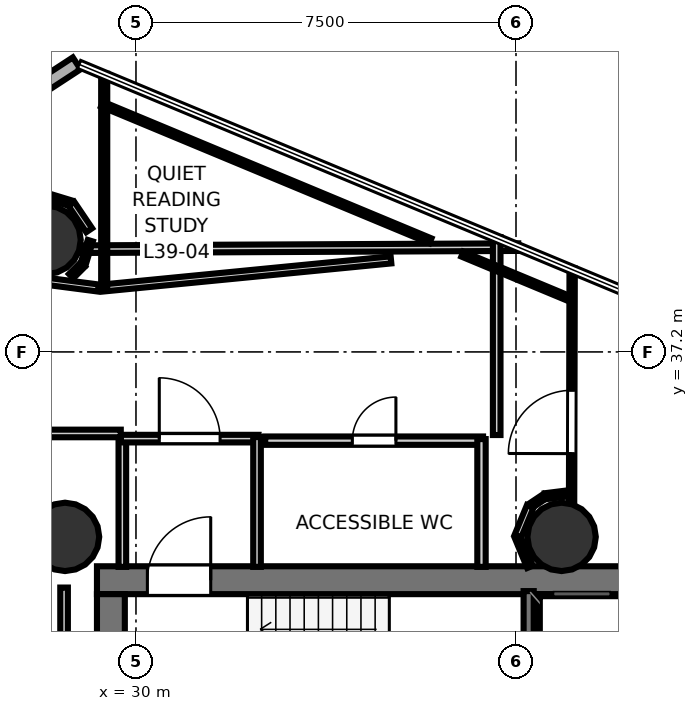
"""IFC4 building model, lengths in metres.
Left out: names, types, materials, properties, quantities, classifications, styles, units other than length and angle.
Written with IfcOpenShell. Run it as: python <this file> out.ifc"""

import sys

from ifc_helpers import new_model, si_unit, direction, frame, frame_2d, origin, origin_2d, place, context, subcontext, project, spatial, rectangle, hollow_circle, extrude, element, fill, save


model = new_model("IFC4")
c1 = context("Model", 3, precision=1e-05, world=origin(), true_north=direction((0.0, 1.0)))
c2 = subcontext(c1, "Body", "Model", "MODEL_VIEW")
j1 = project(units=[si_unit("LENGTHUNIT", "METRE"), si_unit("PLANEANGLEUNIT", "RADIAN")], contexts=[c1])
p1 = place(None, origin())
s1 = spatial("IfcSite", under=j1, at=p1, CompositionType="ELEMENT")
p2 = place(p1, origin())
s2 = spatial("IfcBuilding", under=s1, at=p2, CompositionType="ELEMENT")
p3 = place(p2, frame((0.0, 0.0, 155.0)))
s3 = spatial("IfcBuildingStorey", under=s2, at=p3, CompositionType="ELEMENT", Elevation=155.0)
p4 = place(p3, frame((29.23, 32.695, 0.0), z_axis=(0.0, 0.0, 1.0), x_axis=(1.0, 0.0, 0.0)))
e1 = element("IfcWall", 1, at=p4, inside=s3, PredefinedType="SHEAR", context=c2, shape_type="SweptSolid", body=[
    extrude(rectangle(XDim=10.62, YDim=0.55, at=frame_2d((5.31, 0.0))), origin(), (0.0, 0.0, 1.0), 3.52),
])
p5 = place(p4, frame((0.995, 0.0, 0.0)))
e2 = element("IfcOpeningElement", 2, at=p5, cuts=e1, PredefinedType="OPENING", context=c2, shape_type="SweptSolid", body=[
    extrude(rectangle(XDim=1.25, YDim=2.15, at=frame_2d((0.625, 1.075))), frame((0.0, 0.285, 0.0), z_axis=(0.0, -1.0, 0.0), x_axis=(1.0, 0.0, 0.0)), (0.0, 0.0, 1.0), 0.57),
])
p6 = place(p3, frame((29.505, 24.98, 0.0), z_axis=(0.0, 0.0, 1.0), x_axis=(0.0, 1.0, 0.0)))
e3 = element("IfcWall", 3, at=p6, inside=s3, PredefinedType="SHEAR", context=c2, shape_type="SweptSolid", body=[
    extrude(rectangle(XDim=7.44, YDim=0.55, at=frame_2d((3.72, 0.0))), origin(), (0.0, 0.0, 1.0), 3.52),
])
p7 = place(p3, frame((38.18, 24.98, 0.0), z_axis=(0.0, 0.0, 1.0), x_axis=(0.0, 1.0, 0.0)))
e4 = element("IfcWall", 4, at=p7, inside=s3, PredefinedType="SHEAR", context=c2, shape_type="SweptSolid", body=[
    extrude(rectangle(XDim=7.44, YDim=0.5, at=frame_2d((3.72, 0.0))), origin(), (0.0, 0.0, 1.0), 3.52),
])
for number, where, z_axis, x_axis in (
    (5, (28.6, 33.55, 0.0), (0.0, 0.0, 1.0), (1.0, 0.0, 0.0)),
    (6, (38.4, 33.55, 0.0), (0.0, 0.0, 1.0), (1.0, 0.0, 0.0)),
    (7, (28.235, 39.411, 0.0), (0.0, 0.0, 1.0), (1.0, 0.0, 0.0)),
):
    element("IfcColumn", number, at=place(p3, frame(where, z_axis=z_axis, x_axis=x_axis)), inside=s3, PredefinedType="COLUMN", context=c2, shape_type="SweptSolid", body=[
        extrude(hollow_circle(Radius=0.675, WallThickness=0.032, at=origin_2d()), origin(), (0.0, 0.0, 1.0), 3.7),
    ])
p8 = place(p3, frame((28.83, 42.894, 0.0), z_axis=(0.0, 0.0, 1.0), x_axis=(-0.837273291315, -0.5467846337, 0.0)))
e8 = element("IfcWall", 8, at=p8, inside=s3, PredefinedType="SOLIDWALL", context=c2, shape_type="SweptSolid", body=[
    extrude(rectangle(XDim=9.004, YDim=0.28, at=frame_2d((4.502, 0.0))), origin(), (0.0, 0.0, 1.0), 3.52),
])
p9 = place(p8, frame((1.951, 0.0, 0.85)))
e9 = element("IfcOpeningElement", 9, at=p9, cuts=e8, PredefinedType="OPENING", context=c2, shape_type="SweptSolid", body=[
    extrude(rectangle(XDim=1.5, YDim=2.1, at=frame_2d((0.75, 1.05))), frame((0.0, 0.15, 0.0), z_axis=(0.0, -1.0, 0.0), x_axis=(1.0, 0.0, 0.0)), (0.0, 0.0, 1.0), 0.3),
])
p10 = place(p3, frame((37.75, 30.12, 0.0), z_axis=(0.0, 0.0, 1.0), x_axis=(0.0, 1.0, 0.0)))
e10 = element("IfcWall", 10, at=p10, inside=s3, PredefinedType="SOLIDWALL", context=c2, shape_type="SweptSolid", body=[
    extrude(rectangle(XDim=2.36, YDim=0.2, at=frame_2d((1.18, 0.0))), origin(), (0.0, 0.0, 1.0), 3.52),
])
p11 = place(p3, frame((29.731, 32.958, 0.0), z_axis=(0.0, 0.0, 1.0), x_axis=(0.0, 1.0, 0.0)))
e11 = element("IfcWall", 11, at=p11, inside=s3, PredefinedType="PARTITIONING", context=c2, shape_type="SweptSolid", body=[
    extrude(rectangle(XDim=2.562, YDim=0.15, at=frame_2d((1.281, 0.0))), origin(), (0.0, 0.0, 1.0), 2.84),
])
p12 = place(p3, frame((29.7, 35.489, 0.0), z_axis=(0.0, 0.0, 1.0), x_axis=(1.0, 0.0, 0.0)))
e12 = element("IfcWall", 12, at=p12, inside=s3, PredefinedType="PARTITIONING", context=c2, shape_type="SweptSolid", body=[
    extrude(rectangle(XDim=2.72, YDim=0.15, at=frame_2d((1.36, 0.0))), origin(), (0.0, 0.0, 1.0), 2.84),
])
p13 = place(p12, frame((0.76, 0.0, 0.0)))
e13 = element("IfcOpeningElement", 13, at=p13, cuts=e12, PredefinedType="OPENING", context=c2, shape_type="SweptSolid", body=[
    extrude(rectangle(XDim=1.2, YDim=2.15, at=frame_2d((0.6, 1.075))), frame((0.0, 0.085, 0.0), z_axis=(0.0, -1.0, 0.0), x_axis=(1.0, 0.0, 0.0)), (0.0, 0.0, 1.0), 0.17),
])
p14 = place(p3, frame((32.389, 35.52, 0.0), z_axis=(0.0, 0.0, 1.0), x_axis=(0.0, -1.0, 0.0)))
e14 = element("IfcWall", 14, at=p14, inside=s3, PredefinedType="PARTITIONING", context=c2, shape_type="SweptSolid", body=[
    extrude(rectangle(XDim=2.562, YDim=0.15, at=frame_2d((1.281, 0.0))), origin(), (0.0, 0.0, 1.0), 2.84),
])
p15 = place(p3, frame((32.55, 35.449, 0.0), z_axis=(0.0, 0.0, 1.0), x_axis=(1.0, 0.0, 0.0)))
e15 = element("IfcWall", 15, at=p15, inside=s3, PredefinedType="PLUMBINGWALL", context=c2, shape_type="SweptSolid", body=[
    extrude(rectangle(XDim=4.3, YDim=0.165, at=frame_2d((2.15, 0.0))), origin(), (0.0, 0.0, 1.0), 2.84),
])
p16 = place(p15, frame((1.72, 0.0, 0.0)))
e16 = element("IfcOpeningElement", 16, at=p16, cuts=e15, PredefinedType="OPENING", context=c2, shape_type="SweptSolid", body=[
    extrude(rectangle(XDim=0.86, YDim=2.05, at=frame_2d((0.43, 1.025))), frame((0.0, 0.093, 0.0), z_axis=(0.0, -1.0, 0.0), x_axis=(1.0, 0.0, 0.0)), (0.0, 0.0, 1.0), 0.185),
])
p17 = place(p3, frame((36.819, 35.48, 0.0), z_axis=(0.0, 0.0, 1.0), x_axis=(0.0, -1.0, 0.0)))
e17 = element("IfcWall", 17, at=p17, inside=s3, PredefinedType="PLUMBINGWALL", context=c2, shape_type="SweptSolid", body=[
    extrude(rectangle(XDim=2.522, YDim=0.165, at=frame_2d((1.261, 0.0))), origin(), (0.0, 0.0, 1.0), 2.84),
])
p18 = place(p3, frame((28.581, 24.68, 0.0), z_axis=(0.0, 0.0, 1.0), x_axis=(0.0, 1.0, 0.0)))
e18 = element("IfcWall", 18, at=p18, inside=s3, PredefinedType="PARTITIONING", context=c2, shape_type="SweptSolid", body=[
    extrude(rectangle(XDim=7.87, YDim=0.15, at=frame_2d((3.935, 0.0))), origin(), (0.0, 0.0, 1.0), 2.84),
])
p19 = place(p3, frame((23.174, 39.201, 0.0), z_axis=(0.0, 0.0, 1.0), x_axis=(0.999989166238, 0.004654826148, 0.0)))
e19 = element("IfcWall", 19, at=p19, inside=s3, PredefinedType="PARTITIONING", context=c2, shape_type="SweptSolid", body=[
    extrude(rectangle(XDim=14.371, YDim=0.15, at=frame_2d((7.186, 0.0))), origin(), (0.0, 0.0, 1.0), 2.84),
])
p20 = place(p3, frame((37.119, 39.465, 0.0), z_axis=(0.0, 0.0, 1.0), x_axis=(0.0, -1.0, 0.0)))
e20 = element("IfcWall", 20, at=p20, inside=s3, PredefinedType="PARTITIONING", context=c2, shape_type="SweptSolid", body=[
    extrude(rectangle(XDim=3.905, YDim=0.15, at=frame_2d((1.953, 0.0))), origin(), (0.0, 0.0, 1.0), 2.84),
])
p21 = place(p3, frame((29.7, 35.591, 0.0), z_axis=(0.0, 0.0, 1.0), x_axis=(-1.0, 0.0, 0.0)))
e21 = element("IfcWall", 21, at=p21, inside=s3, PredefinedType="PARTITIONING", context=c2, shape_type="SweptSolid", body=[
    extrude(rectangle(XDim=3.12, YDim=0.15, at=frame_2d((1.56, 0.0))), origin(), (0.0, 0.0, 1.0), 2.84),
])
p22 = place(p3, frame((38.594, 32.958, 0.0), z_axis=(0.0, 0.0, 1.0), x_axis=(0.002446602671, 0.999997007063, 0.0)))
e22 = element("IfcWall", 22, at=p22, inside=s3, PredefinedType="PARTITIONING", context=c2, shape_type="SweptSolid", body=[
    extrude(rectangle(XDim=5.887, YDim=0.105, at=frame_2d((2.944, 0.0))), origin(), (0.0, 0.0, 1.0), 2.84),
])
p23 = place(p22, frame((2.235, 0.0, 0.0)))
e23 = element("IfcOpeningElement", 23, at=p23, cuts=e22, PredefinedType="OPENING", context=c2, shape_type="SweptSolid", body=[
    extrude(rectangle(XDim=1.25, YDim=2.2, at=frame_2d((0.625, 1.1))), frame((0.0, 0.062, 0.0), z_axis=(0.0, -1.0, 0.0), x_axis=(1.0, 0.0, 0.0)), (0.0, 0.0, 1.0), 0.125),
])
p24 = place(p3, frame((35.033, 39.016, 0.0), z_axis=(0.0, 0.0, 1.0), x_axis=(-0.995275640249, -0.097089648918, 0.0)))
e24 = element("IfcWall", 24, at=p24, inside=s3, PredefinedType="PARTITIONING", context=c2, shape_type="SweptSolid", body=[
    extrude(rectangle(XDim=5.718, YDim=0.14, at=frame_2d((2.859, 0.0))), origin(), (0.0, 0.0, 1.0), 2.84),
])
p25 = place(p3, frame((29.373, 38.43, 0.0), z_axis=(0.0, 0.0, 1.0), x_axis=(0.0, 1.0, 0.0)))
e25 = element("IfcWall", 25, at=p25, inside=s3, PredefinedType="PARTITIONING", context=c2, shape_type="SweptSolid", body=[
    extrude(rectangle(XDim=4.258, YDim=0.12, at=frame_2d((2.129, 0.0))), origin(), (0.0, 0.0, 1.0), 2.84),
])
p26 = place(p3, frame((29.33, 42.089, 0.0), z_axis=(0.0, 0.0, 1.0), x_axis=(0.923257907731, -0.384180733265, 0.0)))
e26 = element("IfcWall", 26, at=p26, inside=s3, PredefinedType="PARTITIONING", context=c2, shape_type="SweptSolid", body=[
    extrude(rectangle(XDim=7.02, YDim=0.105, at=frame_2d((3.51, 0.0))), origin(), (0.0, 0.0, 1.0), 2.84),
])
p27 = place(p3, frame((38.502, 34.406, 0.0), z_axis=(0.0, 0.0, 1.0), x_axis=(-0.992260340351, -0.124174945004, 0.0)))
e27 = element("IfcWall", 27, at=p27, inside=s3, PredefinedType="PARTITIONING", context=c2, shape_type="SweptSolid", body=[
    extrude(rectangle(XDim=0.429, YDim=0.12, at=frame_2d((0.214, 0.0))), origin(), (0.0, 0.0, 1.0), 2.84),
])
p28 = place(p3, frame((38.063, 34.347, 0.0), z_axis=(0.0, 0.0, 1.0), x_axis=(-0.83170430964, -0.555218822922, 0.0)))
e28 = element("IfcWall", 28, at=p28, inside=s3, PredefinedType="PARTITIONING", context=c2, shape_type="SweptSolid", body=[
    extrude(rectangle(XDim=0.326, YDim=0.105, at=frame_2d((0.163, 0.0))), origin(), (0.0, 0.0, 1.0), 2.84),
])
p29 = place(p3, frame((37.781, 34.152, 0.0), z_axis=(0.0, 0.0, 1.0), x_axis=(-0.382824178437, -0.923821221018, 0.0)))
e29 = element("IfcWall", 29, at=p29, inside=s3, PredefinedType="PARTITIONING", context=c2, shape_type="SweptSolid", body=[
    extrude(rectangle(XDim=0.639, YDim=0.14, at=frame_2d((0.319, 0.0))), origin(), (0.0, 0.0, 1.0), 2.84),
])
p30 = place(p3, frame((37.536, 33.538, 0.0), z_axis=(0.0, 0.0, 1.0), x_axis=(0.382626535499, -0.923903097912, 0.0)))
e30 = element("IfcWall", 30, at=p30, inside=s3, PredefinedType="PARTITIONING", context=c2, shape_type="SweptSolid", body=[
    extrude(rectangle(XDim=0.628, YDim=0.12, at=frame_2d((0.314, 0.0))), origin(), (0.0, 0.0, 1.0), 2.84),
])
p31 = place(p3, frame((29.076, 39.602, 0.0), z_axis=(0.0, 0.0, 1.0), x_axis=(-0.559799741872, 0.828627931584, 0.0)))
e31 = element("IfcWall", 31, at=p31, inside=s3, PredefinedType="PARTITIONING", context=c2, shape_type="SweptSolid", body=[
    extrude(rectangle(XDim=0.628, YDim=0.14, at=frame_2d((0.314, 0.0))), origin(), (0.0, 0.0, 1.0), 2.84),
])
p32 = place(p3, frame((28.708, 40.135, 0.0), z_axis=(0.0, 0.0, 1.0), x_axis=(-0.95703287226, 0.289979449985, 0.0)))
e32 = element("IfcWall", 32, at=p32, inside=s3, PredefinedType="PARTITIONING", context=c2, shape_type="SweptSolid", body=[
    extrude(rectangle(XDim=0.485, YDim=0.12, at=frame_2d((0.242, 0.0))), origin(), (0.0, 0.0, 1.0), 2.84),
])
p33 = place(p3, frame((28.721, 38.695, 0.0), z_axis=(0.0, 0.0, 1.0), x_axis=(0.707106781187, 0.707106781187, 0.0)))
e33 = element("IfcWall", 33, at=p33, inside=s3, PredefinedType="PARTITIONING", context=c2, shape_type="SweptSolid", body=[
    extrude(rectangle(XDim=0.326, YDim=0.12, at=frame_2d((0.163, 0.0))), origin(), (0.0, 0.0, 1.0), 2.84),
])
p34 = place(p3, frame((28.959, 38.938, 0.0), z_axis=(0.0, 0.0, 1.0), x_axis=(0.292866596221, 0.956153312402, 0.0)))
e34 = element("IfcWall", 34, at=p34, inside=s3, PredefinedType="PARTITIONING", context=c2, shape_type="SweptSolid", body=[
    extrude(rectangle(XDim=0.479, YDim=0.105, at=frame_2d((0.239, 0.0))), origin(), (0.0, 0.0, 1.0), 2.84),
])
p35 = place(p3, frame((29.258, 38.461, 0.0), z_axis=(0.0, 0.0, 1.0), x_axis=(-0.991648515984, 0.128969844331, 0.0)))
e35 = element("IfcWall", 35, at=p35, inside=s3, PredefinedType="PARTITIONING", context=c2, shape_type="SweptSolid", body=[
    extrude(rectangle(XDim=3.956, YDim=0.14, at=frame_2d((1.978, 0.0))), origin(), (0.0, 0.0, 1.0), 2.84),
])
p36 = place(p3, frame((36.441, 39.13, 0.0), z_axis=(0.0, 0.0, 1.0), x_axis=(0.923215709741, -0.384282127202, 0.0)))
e36 = element("IfcWall", 36, at=p36, inside=s3, PredefinedType="PARTITIONING", context=c2, shape_type="SweptSolid", body=[
    extrude(rectangle(XDim=2.237, YDim=0.105, at=frame_2d((1.119, 0.0))), origin(), (0.0, 0.0, 1.0), 2.84),
])
p37 = place(p5, origin())
e37 = element("IfcDoor", 37, at=p37, inside=s3, OperationType="SINGLE_SWING_RIGHT", PredefinedType="DOOR", context=c2, shape_type="SweptSolid", body=[
    extrude(rectangle(XDim=1.25, YDim=2.15, at=frame_2d((0.625, 1.075))), frame((0.0, 0.025, 0.0), z_axis=(0.0, -1.0, 0.0), x_axis=(1.0, 0.0, 0.0)), (0.0, 0.0, 1.0), 0.05),
])
fill(e2, e37)
p38 = place(p13, origin())
e38 = element("IfcDoor", 38, at=p38, inside=s3, OperationType="SINGLE_SWING_LEFT", PredefinedType="DOOR", context=c2, shape_type="SweptSolid", body=[
    extrude(rectangle(XDim=1.2, YDim=2.15, at=frame_2d((0.6, 1.075))), frame((0.0, 0.025, 0.0), z_axis=(0.0, -1.0, 0.0), x_axis=(1.0, 0.0, 0.0)), (0.0, 0.0, 1.0), 0.05),
])
fill(e13, e38)
p39 = place(p16, origin())
e39 = element("IfcDoor", 39, at=p39, inside=s3, OperationType="SINGLE_SWING_RIGHT", PredefinedType="DOOR", context=c2, shape_type="SweptSolid", body=[
    extrude(rectangle(XDim=0.86, YDim=2.05, at=frame_2d((0.43, 1.025))), frame((0.0, 0.025, 0.0), z_axis=(0.0, -1.0, 0.0), x_axis=(1.0, 0.0, 0.0)), (0.0, 0.0, 1.0), 0.05),
])
fill(e16, e39)
p40 = place(p23, origin())
e40 = element("IfcDoor", 40, at=p40, inside=s3, OperationType="SINGLE_SWING_LEFT", PredefinedType="DOOR", context=c2, shape_type="SweptSolid", body=[
    extrude(rectangle(XDim=1.25, YDim=2.2, at=frame_2d((0.625, 1.1))), frame((0.0, 0.025, 0.0), z_axis=(0.0, -1.0, 0.0), x_axis=(1.0, 0.0, 0.0)), (0.0, 0.0, 1.0), 0.05),
])
fill(e23, e40)
save(model, sys.argv[1])
